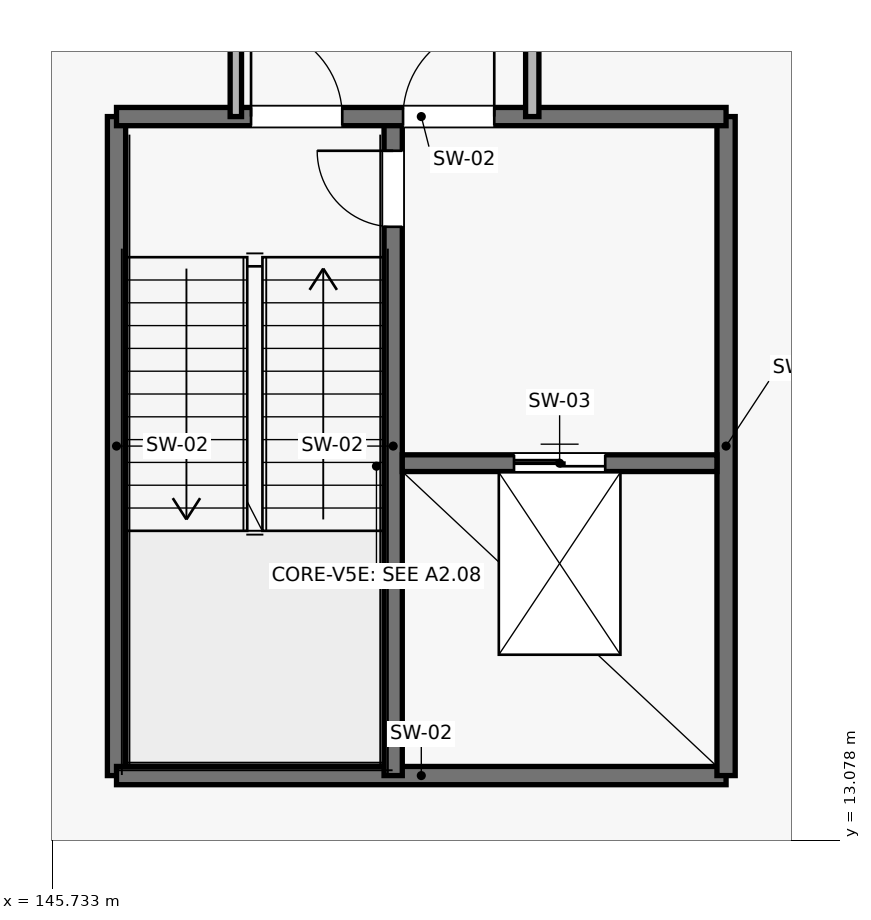
"""IFC4 building model, lengths in metres.
Left out: names, types, materials, properties, quantities, classifications, styles, units other than length and angle.
Written with IfcOpenShell. Run it as: python <this file> out.ifc"""

import sys

from ifc_helpers import new_model, si_unit, direction, frame, frame_2d, origin, place, context, subcontext, project, spatial, rectangle, extrude, element, fill, save


model = new_model("IFC4")
c1 = context("Model", 3, precision=1e-05, world=origin(), true_north=direction((0.0, 1.0)))
c2 = subcontext(c1, "Body", "Model", "MODEL_VIEW")
j1 = project(units=[si_unit("LENGTHUNIT", "METRE"), si_unit("PLANEANGLEUNIT", "RADIAN")], contexts=[c1])
p1 = place(None, origin())
s1 = spatial("IfcSite", under=j1, at=p1, CompositionType="ELEMENT")
p2 = place(p1, origin())
s2 = spatial("IfcBuilding", under=s1, at=p2, CompositionType="ELEMENT")
p3 = place(p2, frame((0.0, 0.0, 6.6)))
s3 = spatial("IfcBuildingStorey", under=s2, at=p3, CompositionType="ELEMENT", Elevation=6.6)
p4 = place(p3, frame((146.58, 22.6, 0.0), z_axis=(0.0, 0.0, 1.0), x_axis=(0.0, -1.0, 0.0)))
e1 = element("IfcWall", 1, at=p4, inside=s3, PredefinedType="SHEAR", context=c2, shape_type="SweptSolid", body=[
    extrude(rectangle(XDim=8.67, YDim=0.24, at=frame_2d((4.335, 0.0))), origin(), (0.0, 0.0, 1.0), 4.47),
])
p5 = place(p3, frame((146.58, 13.93, 0.0), z_axis=(0.0, 0.0, 1.0), x_axis=(1.0, 0.0, 0.0)))
e2 = element("IfcWall", 2, at=p5, inside=s3, PredefinedType="SHEAR", context=c2, shape_type="SweptSolid", body=[
    extrude(rectangle(XDim=8.02, YDim=0.24, at=frame_2d((4.01, 0.0))), origin(), (0.0, 0.0, 1.0), 4.47),
])
p6 = place(p3, frame((150.22, 13.93, 0.0), z_axis=(0.0, 0.0, 1.0), x_axis=(0.0, 1.0, 0.0)))
e3 = element("IfcWall", 3, at=p6, inside=s3, PredefinedType="SHEAR", context=c2, shape_type="SweptSolid", body=[
    extrude(rectangle(XDim=8.67, YDim=0.24, at=frame_2d((4.335, 0.0))), origin(), (0.0, 0.0, 1.0), 4.47),
])
p7 = place(p6, frame((7.22, 0.0, 0.0)))
e4 = element("IfcOpeningElement", 4, at=p7, cuts=e3, PredefinedType="OPENING", context=c2, shape_type="SweptSolid", body=[
    extrude(rectangle(XDim=1.0, YDim=2.2, at=frame_2d((0.5, 1.1))), frame((0.0, 0.135, 0.0), z_axis=(0.0, -1.0, 0.0), x_axis=(1.0, 0.0, 0.0)), (0.0, 0.0, 1.0), 0.27),
])
p8 = place(p3, frame((154.6, 13.93, 0.0), z_axis=(0.0, 0.0, 1.0), x_axis=(0.0, 1.0, 0.0)))
e5 = element("IfcWall", 5, at=p8, inside=s3, PredefinedType="SHEAR", context=c2, shape_type="SweptSolid", body=[
    extrude(rectangle(XDim=8.67, YDim=0.24, at=frame_2d((4.335, 0.0))), origin(), (0.0, 0.0, 1.0), 4.47),
])
p9 = place(p3, frame((146.58, 22.6, 0.0), z_axis=(0.0, 0.0, 1.0), x_axis=(1.0, 0.0, 0.0)))
e6 = element("IfcWall", 6, at=p9, inside=s3, PredefinedType="SHEAR", context=c2, shape_type="SweptSolid", body=[
    extrude(rectangle(XDim=8.02, YDim=0.24, at=frame_2d((4.01, 0.0))), origin(), (0.0, 0.0, 1.0), 4.47),
])
p10 = place(p9, frame((1.77, 0.0, 0.0)))
e7 = element("IfcOpeningElement", 7, at=p10, cuts=e6, PredefinedType="OPENING", context=c2, shape_type="SweptSolid", body=[
    extrude(rectangle(XDim=1.2, YDim=2.2, at=frame_2d((0.6, 1.1))), frame((0.0, 0.135, 0.0), z_axis=(0.0, -1.0, 0.0), x_axis=(1.0, 0.0, 0.0)), (0.0, 0.0, 1.0), 0.27),
])
p11 = place(p9, frame((3.77, 0.0, 0.0)))
e8 = element("IfcOpeningElement", 8, at=p11, cuts=e6, PredefinedType="OPENING", context=c2, shape_type="SweptSolid", body=[
    extrude(rectangle(XDim=1.2, YDim=2.2, at=frame_2d((0.6, 1.1))), frame((0.0, 0.135, 0.0), z_axis=(0.0, -1.0, 0.0), x_axis=(1.0, 0.0, 0.0)), (0.0, 0.0, 1.0), 0.27),
])
p12 = place(p3, frame((150.34, 18.04, 0.0), z_axis=(0.0, 0.0, 1.0), x_axis=(1.0, 0.0, 0.0)))
e9 = element("IfcWall", 9, at=p12, inside=s3, PredefinedType="SHEAR", context=c2, shape_type="SweptSolid", body=[
    extrude(rectangle(XDim=4.14, YDim=0.22, at=frame_2d((2.07, 0.0))), origin(), (0.0, 0.0, 1.0), 4.47),
])
p13 = place(p12, frame((1.47, 0.0, 0.0)))
e10 = element("IfcOpeningElement", 10, at=p13, cuts=e9, PredefinedType="OPENING", context=c2, shape_type="SweptSolid", body=[
    extrude(rectangle(XDim=1.2, YDim=2.2, at=frame_2d((0.6, 1.1))), frame((0.0, 0.125, 0.0), z_axis=(0.0, -1.0, 0.0), x_axis=(1.0, 0.0, 0.0)), (0.0, 0.0, 1.0), 0.25),
])
p14 = place(p3, frame((148.15, 22.6, 0.0), z_axis=(0.0, 0.0, 1.0), x_axis=(0.0, 1.0, 0.0)))
e11 = element("IfcWall", 11, at=p14, inside=s3, PredefinedType="PARTITIONING", context=c2, shape_type="SweptSolid", body=[
    extrude(rectangle(XDim=15.2, YDim=0.15, at=frame_2d((7.6, 0.0))), origin(), (0.0, 0.0, 1.0), 3.433),
])
p15 = place(p14, frame((5.5, 0.0, 0.0)))
e12 = element("IfcOpeningElement", 12, at=p15, cuts=e11, PredefinedType="OPENING", context=c2, shape_type="SweptSolid", body=[
    extrude(rectangle(XDim=0.9, YDim=2.1, at=frame_2d((0.45, 1.05))), frame((0.0, 0.09, 0.0), z_axis=(0.0, -1.0, 0.0), x_axis=(1.0, 0.0, 0.0)), (0.0, 0.0, 1.0), 0.18),
])
p16 = place(p3, frame((152.05, 22.6, 0.0), z_axis=(0.0, 0.0, 1.0), x_axis=(0.0, 1.0, 0.0)))
e13 = element("IfcWall", 13, at=p16, inside=s3, PredefinedType="PARTITIONING", context=c2, shape_type="SweptSolid", body=[
    extrude(rectangle(XDim=15.2, YDim=0.175, at=frame_2d((7.6, 0.0))), origin(), (0.0, 0.0, 1.0), 3.433),
])
p17 = place(p16, frame((5.5, 0.0, 0.0)))
e14 = element("IfcOpeningElement", 14, at=p17, cuts=e13, PredefinedType="OPENING", context=c2, shape_type="SweptSolid", body=[
    extrude(rectangle(XDim=1.0, YDim=2.2, at=frame_2d((0.5, 1.1))), frame((0.0, 0.103, 0.0), z_axis=(0.0, -1.0, 0.0), x_axis=(1.0, 0.0, 0.0)), (0.0, 0.0, 1.0), 0.205),
])
p18 = place(p10, origin())
e15 = element("IfcDoor", 15, at=p18, inside=s3, OperationType="SINGLE_SWING_LEFT", PredefinedType="DOOR", context=c2, shape_type="SweptSolid", body=[
    extrude(rectangle(XDim=1.2, YDim=2.2, at=frame_2d((0.6, 1.1))), frame((0.0, 0.025, 0.0), z_axis=(0.0, -1.0, 0.0), x_axis=(1.0, 0.0, 0.0)), (0.0, 0.0, 1.0), 0.05),
])
fill(e7, e15)
p19 = place(p11, origin())
e16 = element("IfcDoor", 16, at=p19, inside=s3, OperationType="SINGLE_SWING_RIGHT", PredefinedType="DOOR", context=c2, shape_type="SweptSolid", body=[
    extrude(rectangle(XDim=1.2, YDim=2.2, at=frame_2d((0.6, 1.1))), frame((0.0, 0.025, 0.0), z_axis=(0.0, -1.0, 0.0), x_axis=(1.0, 0.0, 0.0)), (0.0, 0.0, 1.0), 0.05),
])
fill(e8, e16)
p20 = place(p7, origin())
e17 = element("IfcDoor", 17, at=p20, inside=s3, OperationType="SINGLE_SWING_RIGHT", PredefinedType="DOOR", context=c2, shape_type="SweptSolid", body=[
    extrude(rectangle(XDim=1.0, YDim=2.2, at=frame_2d((0.5, 1.1))), frame((0.0, 0.025, 0.0), z_axis=(0.0, -1.0, 0.0), x_axis=(1.0, 0.0, 0.0)), (0.0, 0.0, 1.0), 0.05),
])
fill(e4, e17)
p21 = place(p13, origin())
e18 = element("IfcDoor", 18, at=p21, inside=s3, OperationType="DOUBLE_DOOR_SLIDING", PredefinedType="DOOR", context=c2, shape_type="SweptSolid", body=[
    extrude(rectangle(XDim=1.2, YDim=2.2, at=frame_2d((0.6, 1.1))), frame((0.0, 0.025, 0.0), z_axis=(0.0, -1.0, 0.0), x_axis=(1.0, 0.0, 0.0)), (0.0, 0.0, 1.0), 0.05),
])
fill(e10, e18)
save(model, sys.argv[1])
